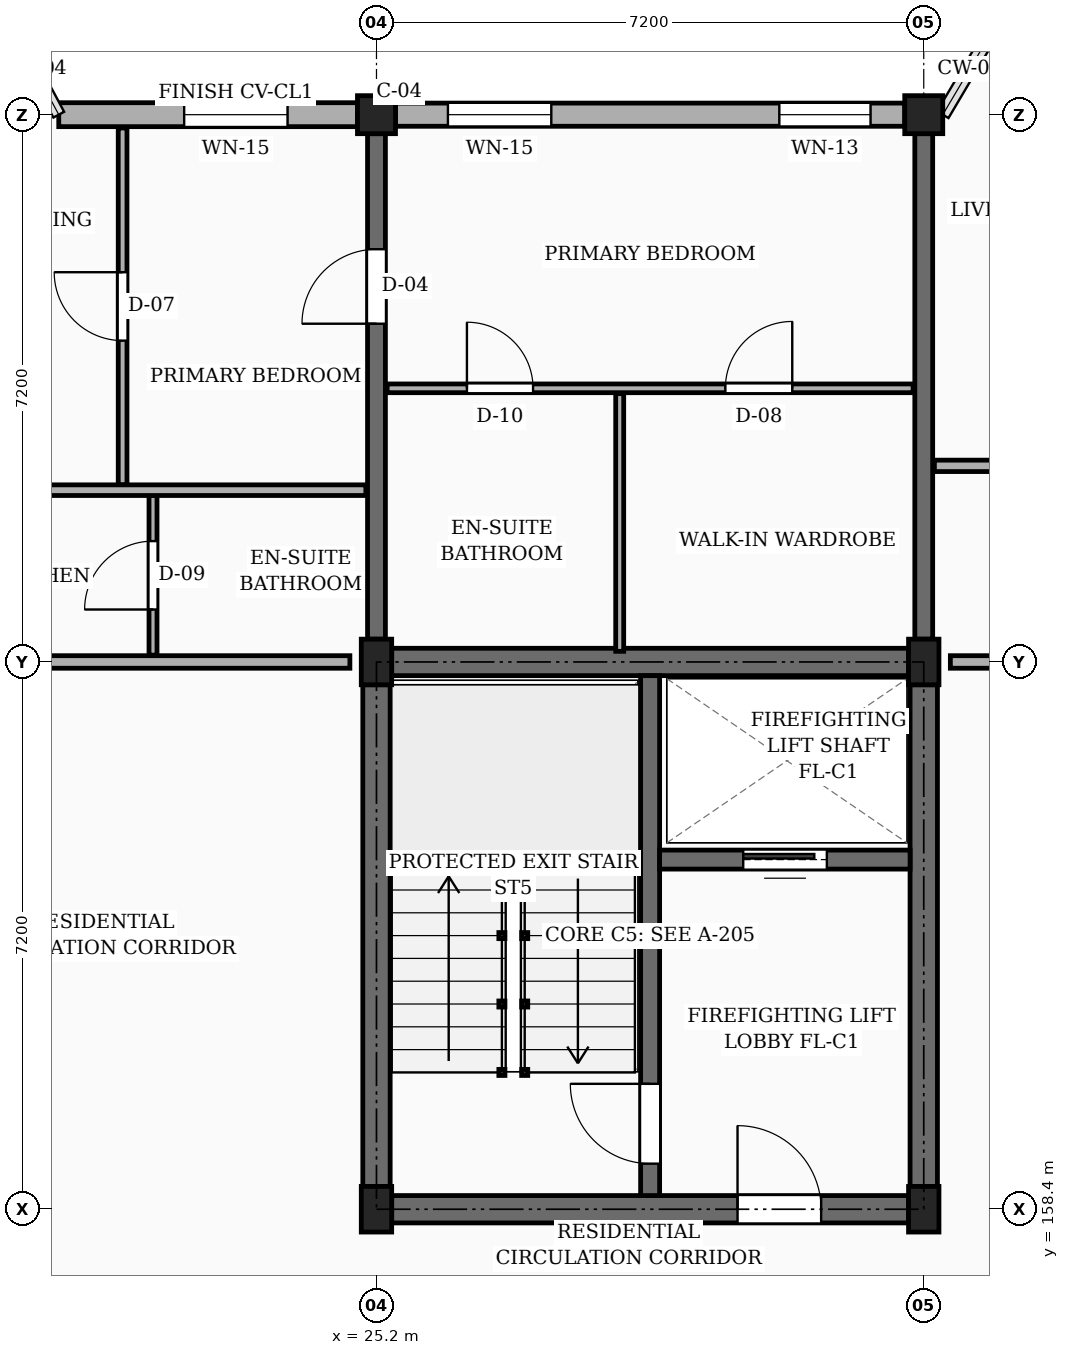
"""IFC4 building model, lengths in metres.
Left out: names, types, materials, properties, quantities, classifications, styles, units other than length and angle.
Written with IfcOpenShell. Run it as: python <this file> out.ifc"""

import sys

from ifc_helpers import new_model, si_unit, direction, frame, frame_2d, origin, origin_2d, place, context, subcontext, project, spatial, rectangle, extrude, element, fill, save


model = new_model("IFC4")
c1 = context("Model", 3, precision=1e-05, world=origin(), true_north=direction((0.0, 1.0)))
c2 = subcontext(c1, "Body", "Model", "MODEL_VIEW")
j1 = project(units=[si_unit("LENGTHUNIT", "METRE"), si_unit("PLANEANGLEUNIT", "RADIAN")], contexts=[c1])
p1 = place(None, origin())
s1 = spatial("IfcSite", under=j1, at=p1, CompositionType="ELEMENT")
p2 = place(p1, origin())
s2 = spatial("IfcBuilding", under=s1, at=p2, CompositionType="ELEMENT")
p3 = place(p2, frame((0.0, 0.0, 23.4)))
s3 = spatial("IfcBuildingStorey", under=s2, at=p3, CompositionType="ELEMENT", Elevation=23.4)
for number, where, z_axis, x_axis in (
    (1, (25.2, 158.4, 0.0), (0.0, 0.0, 1.0), (1.0, 0.0, 0.0)),
    (2, (25.2, 165.6, 0.0), (0.0, 0.0, 1.0), (1.0, 0.0, 0.0)),
):
    element("IfcColumn", number, at=place(p3, frame(where, z_axis=z_axis, x_axis=x_axis)), inside=s3, PredefinedType="COLUMN", context=c2, shape_type="SweptSolid", body=[
        extrude(rectangle(XDim=0.4, YDim=0.6, at=origin_2d()), origin(), (0.0, 0.0, 1.0), 3.15),
    ])
p4 = place(p3, frame((25.2, 172.8, 0.0), z_axis=(0.0, 0.0, 1.0), x_axis=(1.0, 0.0, 0.0)))
e3 = element("IfcColumn", 3, at=p4, inside=s3, PredefinedType="COLUMN", context=c2, shape_type="SweptSolid", body=[
    extrude(rectangle(XDim=0.5, YDim=0.5, at=origin_2d()), origin(), (0.0, 0.0, 1.0), 3.15),
])
for number, where, z_axis, x_axis in (
    (4, (32.4, 158.4, 0.0), (0.0, 0.0, 1.0), (1.0, 0.0, 0.0)),
    (5, (32.4, 165.6, 0.0), (0.0, 0.0, 1.0), (1.0, 0.0, 0.0)),
):
    element("IfcColumn", number, at=place(p3, frame(where, z_axis=z_axis, x_axis=x_axis)), inside=s3, PredefinedType="COLUMN", context=c2, shape_type="SweptSolid", body=[
        extrude(rectangle(XDim=0.4, YDim=0.6, at=origin_2d()), origin(), (0.0, 0.0, 1.0), 3.15),
    ])
p5 = place(p3, frame((32.4, 172.8, 0.0), z_axis=(0.0, 0.0, 1.0), x_axis=(1.0, 0.0, 0.0)))
e6 = element("IfcColumn", 6, at=p5, inside=s3, PredefinedType="COLUMN", context=c2, shape_type="SweptSolid", body=[
    extrude(rectangle(XDim=0.5, YDim=0.5, at=origin_2d()), origin(), (0.0, 0.0, 1.0), 3.15),
])
p6 = place(p3, frame((25.2, 165.9, 0.0), z_axis=(0.0, 0.0, 1.0), x_axis=(0.0, 1.0, 0.0)))
e7 = element("IfcWall", 7, at=p6, inside=s3, PredefinedType="SOLIDWALL", context=c2, shape_type="SweptSolid", body=[
    extrude(rectangle(XDim=6.65, YDim=0.235, at=frame_2d((3.325, 0.0))), origin(), (0.0, 0.0, 1.0), 2.185),
])
p7 = place(p6, frame((4.15, 0.0, 0.0)))
e8 = element("IfcOpeningElement", 8, at=p7, cuts=e7, PredefinedType="OPENING", context=c2, shape_type="SweptSolid", body=[
    extrude(rectangle(XDim=0.98, YDim=2.12, at=frame_2d((0.49, 1.06))), frame((0.0, 0.127, 0.0), z_axis=(0.0, -1.0, 0.0), x_axis=(1.0, 0.0, 0.0)), (0.0, 0.0, 1.0), 0.255),
])
p8 = place(p3, frame((32.4, 165.9, 0.0), z_axis=(0.0, 0.0, 1.0), x_axis=(0.0, 1.0, 0.0)))
e9 = element("IfcWall", 9, at=p8, inside=s3, PredefinedType="SOLIDWALL", context=c2, shape_type="SweptSolid", body=[
    extrude(rectangle(XDim=6.65, YDim=0.235, at=frame_2d((3.325, 0.0))), origin(), (0.0, 0.0, 1.0), 2.185),
])
p9 = place(p3, frame((32.15, 172.8, 0.0), z_axis=(0.0, 0.0, 1.0), x_axis=(-1.0, 0.0, 0.0)))
e10 = element("IfcWall", 10, at=p9, inside=s3, PredefinedType="SOLIDWALL", context=c2, shape_type="SweptSolid", body=[
    extrude(rectangle(XDim=6.7, YDim=0.305, at=frame_2d((3.35, 0.0))), origin(), (0.0, 0.0, 1.0), 2.455),
])
p10 = place(p9, frame((0.45, 0.0, 0.78)))
e11 = element("IfcOpeningElement", 11, at=p10, cuts=e10, PredefinedType="OPENING", context=c2, shape_type="SweptSolid", body=[
    extrude(rectangle(XDim=1.2, YDim=1.26, at=frame_2d((0.6, 0.63))), frame((0.0, 0.163, 0.0), z_axis=(0.0, -1.0, 0.0), x_axis=(1.0, 0.0, 0.0)), (0.0, 0.0, 1.0), 0.325),
])
p11 = place(p9, frame((4.65, 0.0, 0.78)))
e12 = element("IfcOpeningElement", 12, at=p11, cuts=e10, PredefinedType="OPENING", context=c2, shape_type="SweptSolid", body=[
    extrude(rectangle(XDim=1.36, YDim=1.26, at=frame_2d((0.68, 0.63))), frame((0.0, 0.163, 0.0), z_axis=(0.0, -1.0, 0.0), x_axis=(1.0, 0.0, 0.0)), (0.0, 0.0, 1.0), 0.325),
])
p12 = place(p3, frame((24.95, 172.8, 0.0), z_axis=(0.0, 0.0, 1.0), x_axis=(-1.0, 0.0, 0.0)))
e13 = element("IfcWall", 13, at=p12, inside=s3, PredefinedType="SOLIDWALL", context=c2, shape_type="SweptSolid", body=[
    extrude(rectangle(XDim=3.93, YDim=0.315, at=frame_2d((1.965, 0.0))), origin(), (0.0, 0.0, 1.0), 2.455),
])
p13 = place(p12, frame((0.92, 0.0, 0.78)))
e14 = element("IfcOpeningElement", 14, at=p13, cuts=e13, PredefinedType="OPENING", context=c2, shape_type="SweptSolid", body=[
    extrude(rectangle(XDim=1.36, YDim=1.26, at=frame_2d((0.68, 0.63))), frame((0.0, 0.167, 0.0), z_axis=(0.0, -1.0, 0.0), x_axis=(1.0, 0.0, 0.0)), (0.0, 0.0, 1.0), 0.335),
])
p14 = place(p3, frame((25.2, 158.7, 0.0), z_axis=(0.0, 0.0, 1.0), x_axis=(0.0, 1.0, 0.0)))
e15 = element("IfcWall", 15, at=p14, inside=s3, PredefinedType="SHEAR", context=c2, shape_type="SweptSolid", body=[
    extrude(rectangle(XDim=6.6, YDim=0.36, at=frame_2d((3.3, 0.0))), origin(), (0.0, 0.0, 1.0), 2.885),
])
p15 = place(p3, frame((25.4, 165.6, 0.0), z_axis=(0.0, 0.0, 1.0), x_axis=(1.0, 0.0, 0.0)))
e16 = element("IfcWall", 16, at=p15, inside=s3, PredefinedType="SHEAR", context=c2, shape_type="SweptSolid", body=[
    extrude(rectangle(XDim=6.8, YDim=0.36, at=frame_2d((3.4, 0.0))), origin(), (0.0, 0.0, 1.0), 2.885),
])
p16 = place(p3, frame((32.4, 158.7, 0.0), z_axis=(0.0, 0.0, 1.0), x_axis=(0.0, 1.0, 0.0)))
e17 = element("IfcWall", 17, at=p16, inside=s3, PredefinedType="SHEAR", context=c2, shape_type="SweptSolid", body=[
    extrude(rectangle(XDim=6.6, YDim=0.36, at=frame_2d((3.3, 0.0))), origin(), (0.0, 0.0, 1.0), 2.885),
])
p17 = place(p3, frame((25.4, 158.4, 0.0), z_axis=(0.0, 0.0, 1.0), x_axis=(1.0, 0.0, 0.0)))
e18 = element("IfcWall", 18, at=p17, inside=s3, PredefinedType="SHEAR", context=c2, shape_type="SweptSolid", body=[
    extrude(rectangle(XDim=6.8, YDim=0.36, at=frame_2d((3.4, 0.0))), origin(), (0.0, 0.0, 1.0), 2.885),
])
p18 = place(p17, frame((4.55, 0.0, 0.0)))
e19 = element("IfcOpeningElement", 19, at=p18, cuts=e18, PredefinedType="OPENING", context=c2, shape_type="SweptSolid", body=[
    extrude(rectangle(XDim=1.1, YDim=2.15, at=frame_2d((0.55, 1.075))), frame((0.0, 0.19, 0.0), z_axis=(0.0, -1.0, 0.0), x_axis=(1.0, 0.0, 0.0)), (0.0, 0.0, 1.0), 0.38),
])
p19 = place(p3, frame((28.8, 158.58, 0.0), z_axis=(0.0, 0.0, 1.0), x_axis=(0.0, 1.0, 0.0)))
e20 = element("IfcWall", 20, at=p19, inside=s3, PredefinedType="SHEAR", context=c2, shape_type="SweptSolid", body=[
    extrude(rectangle(XDim=6.84, YDim=0.25, at=frame_2d((3.42, 0.0))), origin(), (0.0, 0.0, 1.0), 2.885),
])
p20 = place(p19, frame((0.42, 0.0, 0.0)))
e21 = element("IfcOpeningElement", 21, at=p20, cuts=e20, PredefinedType="OPENING", context=c2, shape_type="SweptSolid", body=[
    extrude(rectangle(XDim=1.05, YDim=2.15, at=frame_2d((0.525, 1.075))), frame((0.0, 0.135, 0.0), z_axis=(0.0, -1.0, 0.0), x_axis=(1.0, 0.0, 0.0)), (0.0, 0.0, 1.0), 0.27),
])
p21 = place(p3, frame((28.925, 163.0, 0.0), z_axis=(0.0, 0.0, 1.0), x_axis=(1.0, 0.0, 0.0)))
e22 = element("IfcWall", 22, at=p21, inside=s3, PredefinedType="SHEAR", context=c2, shape_type="SweptSolid", body=[
    extrude(rectangle(XDim=3.295, YDim=0.25, at=frame_2d((1.647, 0.0))), origin(), (0.0, 0.0, 1.0), 2.885),
])
p22 = place(p21, frame((1.1, 0.0, 0.0)))
e23 = element("IfcOpeningElement", 23, at=p22, cuts=e22, PredefinedType="OPENING", context=c2, shape_type="SweptSolid", body=[
    extrude(rectangle(XDim=1.1, YDim=2.2, at=frame_2d((0.55, 1.1))), frame((0.0, 0.135, 0.0), z_axis=(0.0, -1.0, 0.0), x_axis=(1.0, 0.0, 0.0)), (0.0, 0.0, 1.0), 0.27),
])
p23 = place(p3, frame((18.35, 165.6, 0.0), z_axis=(0.0, 0.0, 1.0), x_axis=(1.0, 0.0, 0.0)))
e24 = element("IfcWall", 24, at=p23, inside=s3, PredefinedType="PARTITIONING", context=c2, shape_type="SweptSolid", body=[
    extrude(rectangle(XDim=6.5, YDim=0.165, at=frame_2d((3.25, 0.0))), origin(), (0.0, 0.0, 1.0), 2.32),
])
p24 = place(p23, frame((1.0, 0.0, 0.0)))
e25 = element("IfcOpeningElement", 25, at=p24, cuts=e24, PredefinedType="OPENING", context=c2, shape_type="SweptSolid", body=[
    extrude(rectangle(XDim=1.0, YDim=2.15, at=frame_2d((0.5, 1.075))), frame((0.0, 0.093, 0.0), z_axis=(0.0, -1.0, 0.0), x_axis=(1.0, 0.0, 0.0)), (0.0, 0.0, 1.0), 0.185),
])
p25 = place(p3, frame((32.75, 165.6, 0.0), z_axis=(0.0, 0.0, 1.0), x_axis=(1.0, 0.0, 0.0)))
e26 = element("IfcWall", 26, at=p25, inside=s3, PredefinedType="PARTITIONING", context=c2, shape_type="SweptSolid", body=[
    extrude(rectangle(XDim=6.5, YDim=0.165, at=frame_2d((3.25, 0.0))), origin(), (0.0, 0.0, 1.0), 2.32),
])
p26 = place(p25, frame((1.0, 0.0, 0.0)))
e27 = element("IfcOpeningElement", 27, at=p26, cuts=e26, PredefinedType="OPENING", context=c2, shape_type="SweptSolid", body=[
    extrude(rectangle(XDim=0.94, YDim=2.12, at=frame_2d((0.47, 1.06))), frame((0.0, 0.093, 0.0), z_axis=(0.0, -1.0, 0.0), x_axis=(1.0, 0.0, 0.0)), (0.0, 0.0, 1.0), 0.185),
])
p27 = place(p3, frame((21.86, 167.93, 0.0), z_axis=(0.0, 0.0, 1.0), x_axis=(0.0, 1.0, 0.0)))
e28 = element("IfcWall", 28, at=p27, inside=s3, PredefinedType="PARTITIONING", context=c2, shape_type="SweptSolid", body=[
    extrude(rectangle(XDim=4.695, YDim=0.115, at=frame_2d((2.348, 0.0))), origin(), (0.0, 0.0, 1.0), 2.32),
])
p28 = place(p27, frame((1.897, 0.0, 0.0)))
e29 = element("IfcOpeningElement", 29, at=p28, cuts=e28, PredefinedType="OPENING", context=c2, shape_type="SweptSolid", body=[
    extrude(rectangle(XDim=0.9, YDim=2.1, at=frame_2d((0.45, 1.05))), frame((0.0, 0.067, 0.0), z_axis=(0.0, -1.0, 0.0), x_axis=(1.0, 0.0, 0.0)), (0.0, 0.0, 1.0), 0.135),
])
p29 = place(p3, frame((22.26, 165.69, 0.0), z_axis=(0.0, 0.0, 1.0), x_axis=(0.0, 1.0, 0.0)))
e30 = element("IfcWall", 30, at=p29, inside=s3, PredefinedType="PARTITIONING", context=c2, shape_type="SweptSolid", body=[
    extrude(rectangle(XDim=2.1, YDim=0.105, at=frame_2d((1.05, 0.0))), origin(), (0.0, 0.0, 1.0), 2.32),
])
p30 = place(p29, frame((0.6, 0.0, 0.0)))
e31 = element("IfcOpeningElement", 31, at=p30, cuts=e30, PredefinedType="OPENING", context=c2, shape_type="SweptSolid", body=[
    extrude(rectangle(XDim=0.9, YDim=2.05, at=frame_2d((0.45, 1.025))), frame((0.0, 0.062, 0.0), z_axis=(0.0, -1.0, 0.0), x_axis=(1.0, 0.0, 0.0)), (0.0, 0.0, 1.0), 0.125),
])
p31 = place(p3, frame((18.14, 167.86, 0.0), z_axis=(0.0, 0.0, 1.0), x_axis=(1.0, 0.0, 0.0)))
e32 = element("IfcWall", 32, at=p31, inside=s3, PredefinedType="PARTITIONING", context=c2, shape_type="SweptSolid", body=[
    extrude(rectangle(XDim=6.92, YDim=0.14, at=frame_2d((3.46, 0.0))), origin(), (0.0, 0.0, 1.0), 2.32),
])
p32 = place(p31, frame((1.31, 0.0, 0.0)))
e33 = element("IfcOpeningElement", 33, at=p32, cuts=e32, PredefinedType="OPENING", context=c2, shape_type="SweptSolid", body=[
    extrude(rectangle(XDim=0.95, YDim=2.1, at=frame_2d((0.475, 1.05))), frame((0.0, 0.08, 0.0), z_axis=(0.0, -1.0, 0.0), x_axis=(1.0, 0.0, 0.0)), (0.0, 0.0, 1.0), 0.16),
])
p33 = place(p3, frame((25.34, 169.2, 0.0), z_axis=(0.0, 0.0, 1.0), x_axis=(1.0, 0.0, 0.0)))
e34 = element("IfcWall", 34, at=p33, inside=s3, PredefinedType="PARTITIONING", context=c2, shape_type="SweptSolid", body=[
    extrude(rectangle(XDim=6.92, YDim=0.115, at=frame_2d((3.46, 0.0))), origin(), (0.0, 0.0, 1.0), 2.32),
])
p34 = place(p33, frame((1.05, 0.0, 0.0)))
e35 = element("IfcOpeningElement", 35, at=p34, cuts=e34, PredefinedType="OPENING", context=c2, shape_type="SweptSolid", body=[
    extrude(rectangle(XDim=0.87, YDim=2.05, at=frame_2d((0.435, 1.025))), frame((0.0, 0.067, 0.0), z_axis=(0.0, -1.0, 0.0), x_axis=(1.0, 0.0, 0.0)), (0.0, 0.0, 1.0), 0.135),
])
p35 = place(p33, frame((4.45, 0.0, 0.0)))
e36 = element("IfcOpeningElement", 36, at=p35, cuts=e34, PredefinedType="OPENING", context=c2, shape_type="SweptSolid", body=[
    extrude(rectangle(XDim=0.88, YDim=2.08, at=frame_2d((0.44, 1.04))), frame((0.0, 0.067, 0.0), z_axis=(0.0, -1.0, 0.0), x_axis=(1.0, 0.0, 0.0)), (0.0, 0.0, 1.0), 0.135),
])
p36 = place(p3, frame((28.4, 165.74, 0.0), z_axis=(0.0, 0.0, 1.0), x_axis=(0.0, 1.0, 0.0)))
e37 = element("IfcWall", 37, at=p36, inside=s3, PredefinedType="PARTITIONING", context=c2, shape_type="SweptSolid", body=[
    extrude(rectangle(XDim=3.39, YDim=0.105, at=frame_2d((1.695, 0.0))), origin(), (0.0, 0.0, 1.0), 2.32),
])
p37 = place(p3, frame((32.54, 168.18, 0.0), z_axis=(0.0, 0.0, 1.0), x_axis=(1.0, 0.0, 0.0)))
e38 = element("IfcWall", 38, at=p37, inside=s3, PredefinedType="PARTITIONING", context=c2, shape_type="SweptSolid", body=[
    extrude(rectangle(XDim=6.92, YDim=0.15, at=frame_2d((3.46, 0.0))), origin(), (0.0, 0.0, 1.0), 2.32),
])
p38 = place(p37, frame((1.31, 0.0, 0.0)))
e39 = element("IfcOpeningElement", 39, at=p38, cuts=e38, PredefinedType="OPENING", context=c2, shape_type="SweptSolid", body=[
    extrude(rectangle(XDim=0.95, YDim=2.1, at=frame_2d((0.475, 1.05))), frame((0.0, 0.085, 0.0), z_axis=(0.0, -1.0, 0.0), x_axis=(1.0, 0.0, 0.0)), (0.0, 0.0, 1.0), 0.17),
])
p39 = place(p10, origin())
e40 = element("IfcWindow", 40, at=p39, inside=s3, PartitioningType="SINGLE_PANEL", PredefinedType="WINDOW", context=c2, shape_type="SweptSolid", body=[
    extrude(rectangle(XDim=1.2, YDim=1.26, at=frame_2d((0.6, 0.63))), frame((0.0, 0.03, 0.0), z_axis=(0.0, -1.0, 0.0), x_axis=(1.0, 0.0, 0.0)), (0.0, 0.0, 1.0), 0.06),
])
fill(e11, e40)
p40 = place(p11, origin())
e41 = element("IfcWindow", 41, at=p40, inside=s3, PartitioningType="SINGLE_PANEL", PredefinedType="WINDOW", context=c2, shape_type="SweptSolid", body=[
    extrude(rectangle(XDim=1.36, YDim=1.26, at=frame_2d((0.68, 0.63))), frame((0.0, 0.03, 0.0), z_axis=(0.0, -1.0, 0.0), x_axis=(1.0, 0.0, 0.0)), (0.0, 0.0, 1.0), 0.06),
])
fill(e12, e41)
p41 = place(p13, origin())
e42 = element("IfcWindow", 42, at=p41, inside=s3, PartitioningType="SINGLE_PANEL", PredefinedType="WINDOW", context=c2, shape_type="SweptSolid", body=[
    extrude(rectangle(XDim=1.36, YDim=1.26, at=frame_2d((0.68, 0.63))), frame((0.0, 0.03, 0.0), z_axis=(0.0, -1.0, 0.0), x_axis=(1.0, 0.0, 0.0)), (0.0, 0.0, 1.0), 0.06),
])
fill(e14, e42)
p42 = place(p18, frame((1.1, 0.0, 0.0), z_axis=(0.0, 0.0, 1.0), x_axis=(-1.0, 0.0, 0.0)))
e43 = element("IfcDoor", 43, at=p42, inside=s3, OperationType="SINGLE_SWING_LEFT", PredefinedType="DOOR", context=c2, shape_type="SweptSolid", body=[
    extrude(rectangle(XDim=1.1, YDim=2.15, at=frame_2d((0.55, 1.075))), frame((0.0, 0.025, 0.0), z_axis=(0.0, -1.0, 0.0), x_axis=(1.0, 0.0, 0.0)), (0.0, 0.0, 1.0), 0.05),
])
fill(e19, e43)
p43 = place(p20, origin())
e44 = element("IfcDoor", 44, at=p43, inside=s3, OperationType="SINGLE_SWING_RIGHT", PredefinedType="DOOR", context=c2, shape_type="SweptSolid", body=[
    extrude(rectangle(XDim=1.05, YDim=2.15, at=frame_2d((0.525, 1.075))), frame((0.0, 0.025, 0.0), z_axis=(0.0, -1.0, 0.0), x_axis=(1.0, 0.0, 0.0)), (0.0, 0.0, 1.0), 0.05),
])
fill(e21, e44)
p44 = place(p22, origin())
e45 = element("IfcDoor", 45, at=p44, inside=s3, OperationType="SLIDING_TO_LEFT", PredefinedType="DOOR", context=c2, shape_type="SweptSolid", body=[
    extrude(rectangle(XDim=1.1, YDim=2.2, at=frame_2d((0.55, 1.1))), frame((0.0, 0.025, 0.0), z_axis=(0.0, -1.0, 0.0), x_axis=(1.0, 0.0, 0.0)), (0.0, 0.0, 1.0), 0.05),
])
fill(e23, e45)
p45 = place(p28, origin())
e46 = element("IfcDoor", 46, at=p45, inside=s3, OperationType="SINGLE_SWING_RIGHT", PredefinedType="DOOR", context=c2, shape_type="SweptSolid", body=[
    extrude(rectangle(XDim=0.9, YDim=2.1, at=frame_2d((0.45, 1.05))), frame((0.0, 0.025, 0.0), z_axis=(0.0, -1.0, 0.0), x_axis=(1.0, 0.0, 0.0)), (0.0, 0.0, 1.0), 0.05),
])
fill(e29, e46)
p46 = place(p30, origin())
e47 = element("IfcDoor", 47, at=p46, inside=s3, OperationType="SINGLE_SWING_LEFT", PredefinedType="DOOR", context=c2, shape_type="SweptSolid", body=[
    extrude(rectangle(XDim=0.9, YDim=2.05, at=frame_2d((0.45, 1.025))), frame((0.0, 0.025, 0.0), z_axis=(0.0, -1.0, 0.0), x_axis=(1.0, 0.0, 0.0)), (0.0, 0.0, 1.0), 0.05),
])
fill(e31, e47)
p47 = place(p34, origin())
e48 = element("IfcDoor", 48, at=p47, inside=s3, OperationType="SINGLE_SWING_LEFT", PredefinedType="DOOR", context=c2, shape_type="SweptSolid", body=[
    extrude(rectangle(XDim=0.87, YDim=2.05, at=frame_2d((0.435, 1.025))), frame((0.0, 0.025, 0.0), z_axis=(0.0, -1.0, 0.0), x_axis=(1.0, 0.0, 0.0)), (0.0, 0.0, 1.0), 0.05),
])
fill(e35, e48)
p48 = place(p35, origin())
e49 = element("IfcDoor", 49, at=p48, inside=s3, OperationType="SINGLE_SWING_RIGHT", PredefinedType="DOOR", context=c2, shape_type="SweptSolid", body=[
    extrude(rectangle(XDim=0.88, YDim=2.08, at=frame_2d((0.44, 1.04))), frame((0.0, 0.025, 0.0), z_axis=(0.0, -1.0, 0.0), x_axis=(1.0, 0.0, 0.0)), (0.0, 0.0, 1.0), 0.05),
])
fill(e36, e49)
p49 = place(p7, origin())
e50 = element("IfcDoor", 50, at=p49, inside=s3, OperationType="SINGLE_SWING_LEFT", PredefinedType="DOOR", context=c2, shape_type="SweptSolid", body=[
    extrude(rectangle(XDim=0.98, YDim=2.12, at=frame_2d((0.49, 1.06))), frame((0.0, 0.025, 0.0), z_axis=(0.0, -1.0, 0.0), x_axis=(1.0, 0.0, 0.0)), (0.0, 0.0, 1.0), 0.05),
])
fill(e8, e50)
save(model, sys.argv[1])
